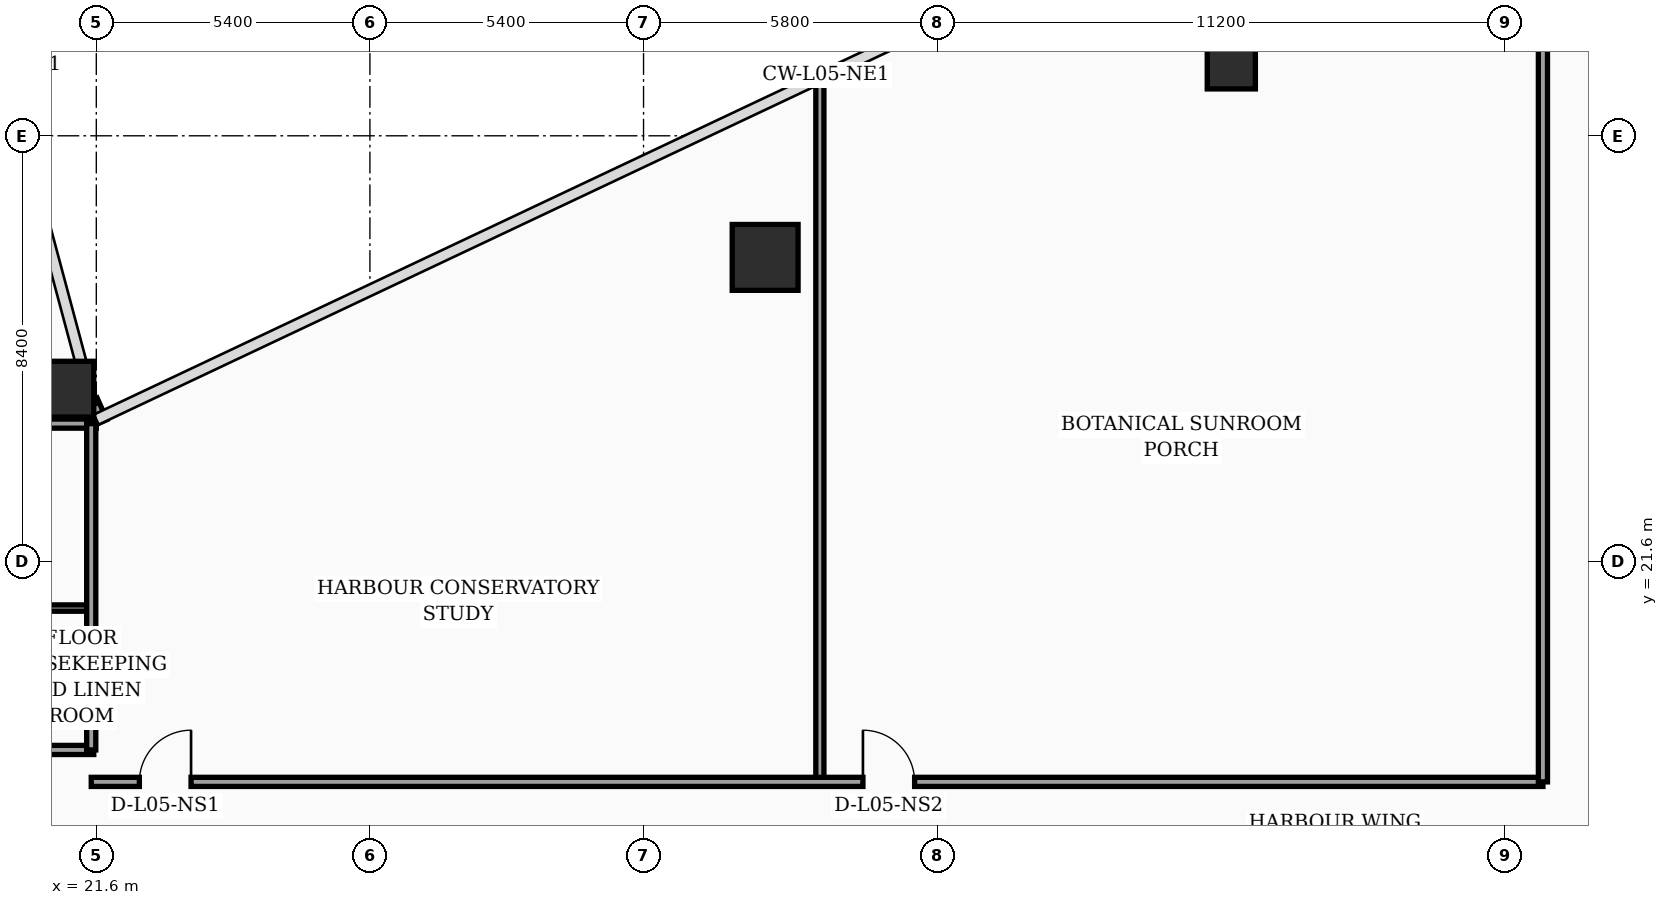
"""IFC4 building model, lengths in metres.
Left out: names, types, materials, properties, quantities, classifications, styles, units other than length and angle.
Written with IfcOpenShell. Run it as: python <this file> out.ifc"""

import sys

from ifc_helpers import new_model, si_unit, direction, frame, frame_2d, origin, origin_2d, place, context, subcontext, project, spatial, rectangle, hollow_rectangle, circle, extrude, element, fill, save


model = new_model("IFC4")
c1 = context("Model", 3, precision=1e-05, world=origin(), true_north=direction((0.0, 1.0)))
c2 = subcontext(c1, "Body", "Model", "MODEL_VIEW")
j1 = project(units=[si_unit("LENGTHUNIT", "METRE"), si_unit("PLANEANGLEUNIT", "RADIAN")], contexts=[c1])
p1 = place(None, origin())
s1 = spatial("IfcSite", under=j1, at=p1, CompositionType="ELEMENT")
p2 = place(p1, origin())
s2 = spatial("IfcBuilding", under=s1, at=p2, CompositionType="ELEMENT")
p3 = place(p2, frame((0.0, 0.0, 27.0)))
s3 = spatial("IfcBuildingStorey", under=s2, at=p3, CompositionType="ELEMENT", Elevation=27.0)
p4 = place(p3, frame((21.0, 25.0, 0.0), z_axis=(0.0, 0.0, 1.0), x_axis=(1.0, 0.0, 0.0)))
e1 = element("IfcColumn", 1, at=p4, inside=s3, PredefinedType="COLUMN", context=c2, shape_type="SweptSolid", body=[
    extrude(hollow_rectangle(XDim=1.1, YDim=1.1, WallThickness=0.045, at=origin_2d()), origin(), (0.0, 0.0, 1.0), 3.56),
])
p5 = place(p3, frame((34.8, 27.6, 0.0), z_axis=(0.0, 0.0, 1.0), x_axis=(1.0, 0.0, 0.0)))
e2 = element("IfcColumn", 2, at=p5, inside=s3, PredefinedType="COLUMN", context=c2, shape_type="SweptSolid", body=[
    extrude(circle(Radius=0.65, at=origin_2d()), origin(), (0.0, 0.0, 1.0), 3.56),
])
p6 = place(p3, frame((44.0, 31.4, 0.0), z_axis=(0.0, 0.0, 1.0), x_axis=(1.0, 0.0, 0.0)))
e3 = element("IfcColumn", 3, at=p6, inside=s3, PredefinedType="COLUMN", context=c2, shape_type="SweptSolid", body=[
    extrude(hollow_rectangle(XDim=0.95, YDim=0.95, WallThickness=0.04, at=origin_2d()), origin(), (0.0, 0.0, 1.0), 3.56),
])
p7 = place(p3, frame((21.68, 24.34, 0.0), z_axis=(0.0, 0.0, 1.0), x_axis=(-0.40758134973, 0.913168901875, 0.0)))
e4 = element("IfcWall", 4, at=p7, inside=s3, PredefinedType="SOLIDWALL", context=c2, shape_type="SweptSolid", body=[
    extrude(rectangle(XDim=0.471, YDim=0.28, at=frame_2d((0.235, 0.0))), origin(), (0.0, 0.0, 1.0), 3.56),
])
p8 = place(p3, frame((17.25, 17.88, 0.0), z_axis=(0.0, 0.0, 1.0), x_axis=(1.0, 0.0, 0.0)))
e5 = element("IfcWall", 5, at=p8, inside=s3, PredefinedType="PARTITIONING", context=c2, shape_type="SweptSolid", body=[
    extrude(rectangle(XDim=4.3, YDim=0.18, at=frame_2d((2.15, 0.0))), origin(), (0.0, 0.0, 1.0), 3.56),
])
p9 = place(p3, frame((17.25, 20.68, 0.0), z_axis=(0.0, 0.0, 1.0), x_axis=(1.0, 0.0, 0.0)))
e6 = element("IfcWall", 6, at=p9, inside=s3, PredefinedType="PARTITIONING", context=c2, shape_type="SweptSolid", body=[
    extrude(rectangle(XDim=4.3, YDim=0.125, at=frame_2d((2.15, 0.0))), origin(), (0.0, 0.0, 1.0), 3.56),
])
p10 = place(p3, frame((17.25, 24.32, 0.0), z_axis=(0.0, 0.0, 1.0), x_axis=(1.0, 0.0, 0.0)))
e7 = element("IfcWall", 7, at=p10, inside=s3, PredefinedType="PARTITIONING", context=c2, shape_type="SweptSolid", body=[
    extrude(rectangle(XDim=4.35, YDim=0.18, at=frame_2d((2.175, 0.0))), origin(), (0.0, 0.0, 1.0), 3.56),
])
p11 = place(p3, frame((21.5, 17.88, 0.0), z_axis=(0.0, 0.0, 1.0), x_axis=(0.0, 1.0, 0.0)))
e8 = element("IfcWall", 8, at=p11, inside=s3, PredefinedType="PARTITIONING", context=c2, shape_type="SweptSolid", body=[
    extrude(rectangle(XDim=6.44, YDim=0.18, at=frame_2d((3.22, 0.0))), origin(), (0.0, 0.0, 1.0), 3.56),
])
p12 = place(p3, frame((35.88, 17.25, 0.0), z_axis=(0.0, 0.0, 1.0), x_axis=(0.0, 1.0, 0.0)))
e9 = element("IfcWall", 9, at=p12, inside=s3, PredefinedType="PARTITIONING", context=c2, shape_type="SweptSolid", body=[
    extrude(rectangle(XDim=13.97, YDim=0.16, at=frame_2d((6.985, 0.0))), origin(), (0.0, 0.0, 1.0), 2.84),
])
p13 = place(p3, frame((21.5, 17.25, 0.0), z_axis=(0.0, 0.0, 1.0), x_axis=(1.0, 0.0, 0.0)))
e10 = element("IfcWall", 10, at=p13, inside=s3, PredefinedType="PARTITIONING", context=c2, shape_type="SweptSolid", body=[
    extrude(rectangle(XDim=28.65, YDim=0.18, at=frame_2d((14.325, 0.0))), origin(), (0.0, 0.0, 1.0), 2.84),
])
p14 = place(p13, frame((0.95, 0.0, 0.0)))
e11 = element("IfcOpeningElement", 11, at=p14, cuts=e10, PredefinedType="OPENING", context=c2, shape_type="SweptSolid", body=[
    extrude(rectangle(XDim=1.02, YDim=2.2, at=frame_2d((0.51, 1.1))), frame((0.0, 0.1, 0.0), z_axis=(0.0, -1.0, 0.0), x_axis=(1.0, 0.0, 0.0)), (0.0, 0.0, 1.0), 0.2),
])
p15 = place(p13, frame((15.23, 0.0, 0.0)))
e12 = element("IfcOpeningElement", 12, at=p15, cuts=e10, PredefinedType="OPENING", context=c2, shape_type="SweptSolid", body=[
    extrude(rectangle(XDim=1.02, YDim=2.2, at=frame_2d((0.51, 1.1))), frame((0.0, 0.1, 0.0), z_axis=(0.0, -1.0, 0.0), x_axis=(1.0, 0.0, 0.0)), (0.0, 0.0, 1.0), 0.2),
])
p16 = place(p3, frame((50.15, 17.25, 0.0), z_axis=(0.0, 0.0, 1.0), x_axis=(0.0, 1.0, 0.0)))
e13 = element("IfcWall", 13, at=p16, inside=s3, PredefinedType="PARTITIONING", context=c2, shape_type="SweptSolid", body=[
    extrude(rectangle(XDim=20.71, YDim=0.18, at=frame_2d((10.355, 0.0))), origin(), (0.0, 0.0, 1.0), 2.84),
])
p17 = place(p14, origin())
e14 = element("IfcDoor", 14, at=p17, inside=s3, OperationType="SINGLE_SWING_RIGHT", PredefinedType="DOOR", context=c2, shape_type="SweptSolid", body=[
    extrude(rectangle(XDim=1.02, YDim=2.2, at=frame_2d((0.51, 1.1))), frame((0.0, 0.025, 0.0), z_axis=(0.0, -1.0, 0.0), x_axis=(1.0, 0.0, 0.0)), (0.0, 0.0, 1.0), 0.05),
])
fill(e11, e14)
p18 = place(p15, origin())
e15 = element("IfcDoor", 15, at=p18, inside=s3, OperationType="SINGLE_SWING_LEFT", PredefinedType="DOOR", context=c2, shape_type="SweptSolid", body=[
    extrude(rectangle(XDim=1.02, YDim=2.2, at=frame_2d((0.51, 1.1))), frame((0.0, 0.025, 0.0), z_axis=(0.0, -1.0, 0.0), x_axis=(1.0, 0.0, 0.0)), (0.0, 0.0, 1.0), 0.05),
])
fill(e12, e15)
save(model, sys.argv[1])
